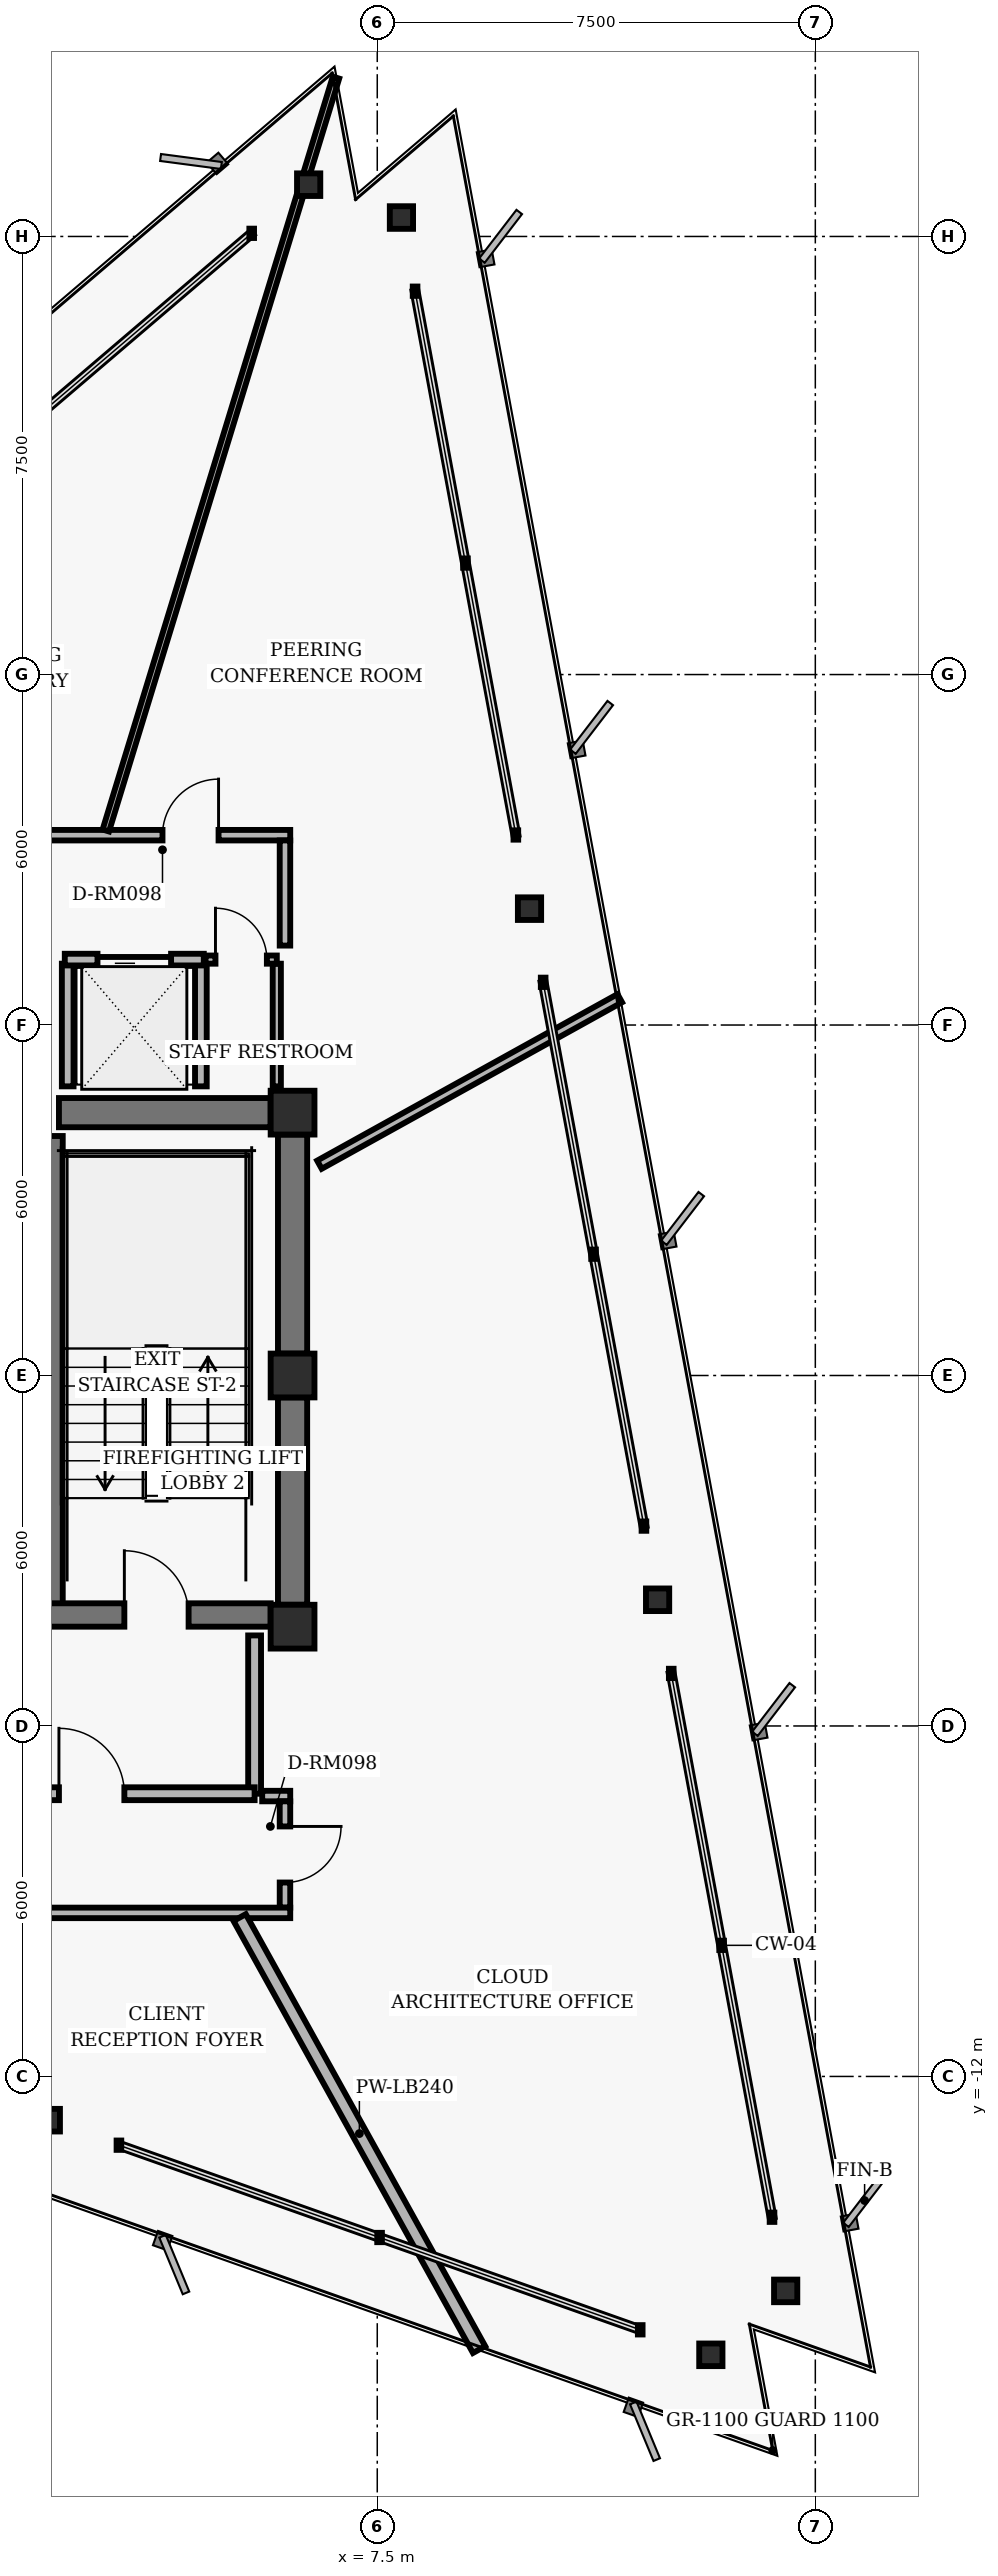
"""IFC4 building model, lengths in metres.
Left out: names, types, materials, properties, quantities, classifications, styles, units other than length and angle.
Written with IfcOpenShell. Run it as: python <this file> out.ifc"""

import sys

from ifc_helpers import new_model, si_unit, direction, frame, frame_2d, origin, origin_2d, place, context, subcontext, project, spatial, rectangle, hollow_rectangle, i_section, extrude, element, fill, save


model = new_model("IFC4")
c1 = context("Model", 3, precision=1e-05, world=origin(), true_north=direction((0.0, 1.0)))
c2 = subcontext(c1, "Body", "Model", "MODEL_VIEW")
j1 = project(units=[si_unit("LENGTHUNIT", "METRE"), si_unit("PLANEANGLEUNIT", "RADIAN")], contexts=[c1])
p1 = place(None, origin())
s1 = spatial("IfcSite", under=j1, at=p1, CompositionType="ELEMENT")
p2 = place(p1, origin())
s2 = spatial("IfcBuilding", under=s1, at=p2, CompositionType="ELEMENT")
p3 = place(p2, frame((0.0, 0.0, 175.36)))
s3 = spatial("IfcBuildingStorey", under=s2, at=p3, CompositionType="ELEMENT", Elevation=175.36)
for number, where, z_axis, x_axis in (
    (1, (6.05, 4.5, 0.0), (0.0, 0.0, 1.0), (1.0, 0.0, 0.0)),
    (2, (6.05, 0.0, 0.0), (0.0, 0.0, 1.0), (1.0, 0.0, 0.0)),
    (3, (6.05, -4.3, 0.0), (0.0, 0.0, 1.0), (1.0, 0.0, 0.0)),
):
    element("IfcColumn", number, at=place(p3, frame(where, z_axis=z_axis, x_axis=x_axis)), inside=s3, PredefinedType="COLUMN", context=c2, shape_type="SweptSolid", body=[
        extrude(hollow_rectangle(XDim=0.75, YDim=0.75, WallThickness=0.05, InnerFilletRadius=0.02, OuterFilletRadius=0.04, at=origin_2d()), origin(), (0.0, 0.0, 1.0), 3.04),
    ])
p4 = place(p3, frame((6.05, 0.375, 0.0), z_axis=(0.0, 0.0, 1.0), x_axis=(0.0, 1.0, 0.0)))
e4 = element("IfcWall", 4, at=p4, inside=s3, PredefinedType="SHEAR", context=c2, shape_type="SweptSolid", body=[
    extrude(rectangle(XDim=3.75, YDim=0.5, at=frame_2d((1.875, 0.0))), origin(), (0.0, 0.0, 1.0), 2.798),
])
p5 = place(p3, frame((6.05, -3.925, 0.0), z_axis=(0.0, 0.0, 1.0), x_axis=(0.0, 1.0, 0.0)))
e5 = element("IfcWall", 5, at=p5, inside=s3, PredefinedType="SHEAR", context=c2, shape_type="SweptSolid", body=[
    extrude(rectangle(XDim=3.55, YDim=0.5, at=frame_2d((1.775, 0.0))), origin(), (0.0, 0.0, 1.0), 2.798),
])
p6 = place(p3, frame((1.94, -4.1, 0.0), z_axis=(0.0, 0.0, 1.0), x_axis=(0.0, 1.0, 0.0)))
e6 = element("IfcWall", 6, at=p6, inside=s3, PredefinedType="SHEAR", context=c2, shape_type="SweptSolid", body=[
    extrude(rectangle(XDim=8.2, YDim=0.35, at=frame_2d((4.1, 0.0))), origin(), (0.0, 0.0, 1.0), 2.798),
])
p7 = place(p3, frame((-5.675, -4.1, 0.0), z_axis=(0.0, 0.0, 1.0), x_axis=(1.0, 0.0, 0.0)))
e7 = element("IfcWall", 7, at=p7, inside=s3, PredefinedType="SHEAR", context=c2, shape_type="SweptSolid", body=[
    extrude(rectangle(XDim=11.35, YDim=0.4, at=frame_2d((5.675, 0.0))), origin(), (0.0, 0.0, 1.0), 2.798),
])
p8 = place(p7, frame((1.405, 0.0, 0.0)))
e8 = element("IfcOpeningElement", 8, at=p8, cuts=e7, PredefinedType="OPENING", context=c2, shape_type="SweptSolid", body=[
    extrude(rectangle(XDim=1.1, YDim=2.04, at=frame_2d((0.55, 1.02))), frame((0.0, 0.21, 0.0), z_axis=(0.0, -1.0, 0.0), x_axis=(1.0, 0.0, 0.0)), (0.0, 0.0, 1.0), 0.42),
])
p9 = place(p7, frame((8.845, 0.0, 0.0)))
e9 = element("IfcOpeningElement", 9, at=p9, cuts=e7, PredefinedType="OPENING", context=c2, shape_type="SweptSolid", body=[
    extrude(rectangle(XDim=1.1, YDim=2.04, at=frame_2d((0.55, 1.02))), frame((0.0, 0.21, 0.0), z_axis=(0.0, -1.0, 0.0), x_axis=(1.0, 0.0, 0.0)), (0.0, 0.0, 1.0), 0.42),
])
p10 = place(p7, frame((4.145, 0.0, 0.0)))
e10 = element("IfcOpeningElement", 10, at=p10, cuts=e7, PredefinedType="OPENING", context=c2, shape_type="SweptSolid", body=[
    extrude(rectangle(XDim=1.06, YDim=2.04, at=frame_2d((0.53, 1.02))), frame((0.0, 0.21, 0.0), z_axis=(0.0, -1.0, 0.0), x_axis=(1.0, 0.0, 0.0)), (0.0, 0.0, 1.0), 0.42),
])
p11 = place(p7, frame((6.145, 0.0, 0.0)))
e11 = element("IfcOpeningElement", 11, at=p11, cuts=e7, PredefinedType="OPENING", context=c2, shape_type="SweptSolid", body=[
    extrude(rectangle(XDim=1.06, YDim=2.04, at=frame_2d((0.53, 1.02))), frame((0.0, 0.21, 0.0), z_axis=(0.0, -1.0, 0.0), x_axis=(1.0, 0.0, 0.0)), (0.0, 0.0, 1.0), 0.42),
])
p12 = place(p3, frame((2.05, 4.5, 0.0), z_axis=(0.0, 0.0, 1.0), x_axis=(1.0, 0.0, 0.0)))
e12 = element("IfcWall", 12, at=p12, inside=s3, PredefinedType="SHEAR", context=c2, shape_type="SweptSolid", body=[
    extrude(rectangle(XDim=3.625, YDim=0.5, at=frame_2d((1.812, 0.0))), origin(), (0.0, 0.0, 1.0), 2.798),
])
for number, where, z_axis, x_axis in (
    (13, (14.492, -15.671, 0.0), (0.0, 0.0, 1.0), (1.0, 0.0, 0.0)),
    (14, (12.3, -3.84, 0.0), (0.0, 0.0, 1.0), (1.0, 0.0, 0.0)),
    (15, (10.107, 7.992, 0.0), (0.0, 0.0, 1.0), (1.0, 0.0, 0.0)),
    (16, (7.914, 19.824, 0.0), (0.0, 0.0, 1.0), (1.0, 0.0, 0.0)),
    (17, (6.325, 20.387, 0.0), (0.0, 0.0, 1.0), (1.0, 0.0, 0.0)),
    (18, (1.868, -12.749, 0.0), (0.0, 0.0, 1.0), (1.0, 0.0, 0.0)),
    (19, (13.211, -16.766, 0.0), (0.0, 0.0, 1.0), (1.0, 0.0, 0.0)),
):
    element("IfcColumn", number, at=place(p3, frame(where, z_axis=z_axis, x_axis=x_axis)), inside=s3, PredefinedType="COLUMN", context=c2, shape_type="SweptSolid", body=[
        extrude(i_section(OverallWidth=0.398, OverallDepth=0.387, WebThickness=0.021, FlangeThickness=0.033, FilletRadius=0.018, at=origin_2d()), origin(), (0.0, 0.0, 1.0), 3.04),
    ])
p13 = place(p3, frame((5.4, -7.16, 0.0), z_axis=(0.0, 0.0, 1.0), x_axis=(0.0, 1.0, 0.0)))
e20 = element("IfcWall", 20, at=p13, inside=s3, PredefinedType="PARTITIONING", context=c2, shape_type="SweptSolid", body=[
    extrude(rectangle(XDim=2.71, YDim=0.22, at=frame_2d((1.355, 0.0))), origin(), (0.0, 0.0, 1.0), 2.773),
])
p14 = place(p3, frame((0.0, -7.16, 0.0), z_axis=(0.0, 0.0, 1.0), x_axis=(1.0, 0.0, 0.0)))
e21 = element("IfcWall", 21, at=p14, inside=s3, PredefinedType="PARTITIONING", context=c2, shape_type="SweptSolid", body=[
    extrude(rectangle(XDim=5.4, YDim=0.22, at=frame_2d((2.7, 0.0))), origin(), (0.0, 0.0, 1.0), 2.395),
])
p15 = place(p14, frame((2.05, 0.0, 0.0)))
e22 = element("IfcOpeningElement", 22, at=p15, cuts=e21, PredefinedType="OPENING", context=c2, shape_type="SweptSolid", body=[
    extrude(rectangle(XDim=1.12, YDim=2.02, at=frame_2d((0.56, 1.01))), frame((0.0, 0.12, 0.0), z_axis=(0.0, -1.0, 0.0), x_axis=(1.0, 0.0, 0.0)), (0.0, 0.0, 1.0), 0.24),
])
for number, where, z_axis, x_axis in (
    (23, (2.2, 4.95, 0.0), (0.0, 0.0, 1.0), (0.0, 1.0, 0.0)),
    (24, (4.48, 4.95, 0.0), (0.0, 0.0, 1.0), (0.0, 1.0, 0.0)),
):
    element("IfcWall", number, at=place(p3, frame(where, z_axis=z_axis, x_axis=x_axis)), inside=s3, PredefinedType="PARTITIONING", context=c2, shape_type="SweptSolid", body=[
        extrude(rectangle(XDim=2.1, YDim=0.2, at=frame_2d((1.05, 0.0))), origin(), (0.0, 0.0, 1.0), 2.773),
    ])
p16 = place(p3, frame((2.15, 7.12, 0.0), z_axis=(0.0, 0.0, 1.0), x_axis=(1.0, 0.0, 0.0)))
e25 = element("IfcWall", 25, at=p16, inside=s3, PredefinedType="PARTITIONING", context=c2, shape_type="SweptSolid", body=[
    extrude(rectangle(XDim=2.38, YDim=0.2, at=frame_2d((1.19, 0.0))), origin(), (0.0, 0.0, 1.0), 2.773),
])
p17 = place(p16, frame((0.56, 0.0, 0.0)))
e26 = element("IfcOpeningElement", 26, at=p17, cuts=e25, PredefinedType="OPENING", context=c2, shape_type="SweptSolid", body=[
    extrude(rectangle(XDim=1.26, YDim=2.06, at=frame_2d((0.63, 1.03))), frame((0.0, 0.11, 0.0), z_axis=(0.0, -1.0, 0.0), x_axis=(1.0, 0.0, 0.0)), (0.0, 0.0, 1.0), 0.22),
])
p18 = place(p3, frame((5.78, 4.95, 0.0), z_axis=(0.0, 0.0, 1.0), x_axis=(0.0, 1.0, 0.0)))
e27 = element("IfcWall", 27, at=p18, inside=s3, PredefinedType="PARTITIONING", context=c2, shape_type="SweptSolid", body=[
    extrude(rectangle(XDim=2.1, YDim=0.14, at=frame_2d((1.05, 0.0))), origin(), (0.0, 0.0, 1.0), 2.253),
])
p19 = place(p3, frame((4.56, 7.12, 0.0), z_axis=(0.0, 0.0, 1.0), x_axis=(1.0, 0.0, 0.0)))
e28 = element("IfcWall", 28, at=p19, inside=s3, PredefinedType="PARTITIONING", context=c2, shape_type="SweptSolid", body=[
    extrude(rectangle(XDim=1.22, YDim=0.14, at=frame_2d((0.61, 0.0))), origin(), (0.0, 0.0, 1.0), 2.773),
])
p20 = place(p19, frame((0.17, 0.0, 0.0)))
e29 = element("IfcOpeningElement", 29, at=p20, cuts=e28, PredefinedType="OPENING", context=c2, shape_type="SweptSolid", body=[
    extrude(rectangle(XDim=0.88, YDim=2.02, at=frame_2d((0.44, 1.01))), frame((0.0, 0.08, 0.0), z_axis=(0.0, -1.0, 0.0), x_axis=(1.0, 0.0, 0.0)), (0.0, 0.0, 1.0), 0.16),
])
p21 = place(p3, frame((-7.29, 9.25, 0.0), z_axis=(0.0, 0.0, 1.0), x_axis=(1.0, 0.0, 0.0)))
e30 = element("IfcWall", 30, at=p21, inside=s3, PredefinedType="PARTITIONING", context=c2, shape_type="SweptSolid", body=[
    extrude(rectangle(XDim=13.3, YDim=0.18, at=frame_2d((6.65, 0.0))), origin(), (0.0, 0.0, 1.0), 2.773),
])
p22 = place(p21, frame((11.113, 0.0, 0.0)))
e31 = element("IfcOpeningElement", 31, at=p22, cuts=e30, PredefinedType="OPENING", context=c2, shape_type="SweptSolid", body=[
    extrude(rectangle(XDim=0.96, YDim=2.02, at=frame_2d((0.48, 1.01))), frame((0.0, 0.1, 0.0), z_axis=(0.0, -1.0, 0.0), x_axis=(1.0, 0.0, 0.0)), (0.0, 0.0, 1.0), 0.2),
])
p23 = place(p21, frame((5.827, 0.0, 0.0)))
e32 = element("IfcOpeningElement", 32, at=p23, cuts=e30, PredefinedType="OPENING", context=c2, shape_type="SweptSolid", body=[
    extrude(rectangle(XDim=1.02, YDim=2.02, at=frame_2d((0.51, 1.01))), frame((0.0, 0.1, 0.0), z_axis=(0.0, -1.0, 0.0), x_axis=(1.0, 0.0, 0.0)), (0.0, 0.0, 1.0), 0.2),
])
p24 = place(p3, frame((5.92, 9.16, 0.0), z_axis=(0.0, 0.0, 1.0), x_axis=(0.0, -1.0, 0.0)))
e33 = element("IfcWall", 33, at=p24, inside=s3, PredefinedType="PARTITIONING", context=c2, shape_type="SweptSolid", body=[
    extrude(rectangle(XDim=1.8, YDim=0.18, at=frame_2d((0.9, 0.0))), origin(), (0.0, 0.0, 1.0), 2.253),
])
p25 = place(p3, frame((5.53, -7.2, 0.0), z_axis=(0.0, 0.0, 1.0), x_axis=(1.0, 0.0, 0.0)))
e34 = element("IfcWall", 34, at=p25, inside=s3, PredefinedType="PARTITIONING", context=c2, shape_type="SweptSolid", body=[
    extrude(rectangle(XDim=0.48, YDim=0.18, at=frame_2d((0.24, 0.0))), origin(), (0.0, 0.0, 1.0), 2.773),
])
p26 = place(p3, frame((5.92, -7.29, 0.0), z_axis=(0.0, 0.0, 1.0), x_axis=(0.0, -1.0, 0.0)))
e35 = element("IfcWall", 35, at=p26, inside=s3, PredefinedType="PARTITIONING", context=c2, shape_type="SweptSolid", body=[
    extrude(rectangle(XDim=1.82, YDim=0.18, at=frame_2d((0.91, 0.0))), origin(), (0.0, 0.0, 1.0), 2.773),
])
p27 = place(p26, frame((0.43, 0.0, 0.0)))
e36 = element("IfcOpeningElement", 36, at=p27, cuts=e35, PredefinedType="OPENING", context=c2, shape_type="SweptSolid", body=[
    extrude(rectangle(XDim=0.96, YDim=2.02, at=frame_2d((0.48, 1.01))), frame((0.0, 0.1, 0.0), z_axis=(0.0, -1.0, 0.0), x_axis=(1.0, 0.0, 0.0)), (0.0, 0.0, 1.0), 0.2),
])
p28 = place(p3, frame((6.01, -9.2, 0.0), z_axis=(0.0, 0.0, 1.0), x_axis=(-1.0, 0.0, 0.0)))
e37 = element("IfcWall", 37, at=p28, inside=s3, PredefinedType="PARTITIONING", context=c2, shape_type="SweptSolid", body=[
    extrude(rectangle(XDim=13.3, YDim=0.18, at=frame_2d((6.65, 0.0))), origin(), (0.0, 0.0, 1.0), 2.395),
])
p29 = place(p28, frame((10.465, 0.0, 0.0)))
e38 = element("IfcOpeningElement", 38, at=p29, cuts=e37, PredefinedType="OPENING", context=c2, shape_type="SweptSolid", body=[
    extrude(rectangle(XDim=0.96, YDim=2.02, at=frame_2d((0.48, 1.01))), frame((0.0, 0.1, 0.0), z_axis=(0.0, -1.0, 0.0), x_axis=(1.0, 0.0, 0.0)), (0.0, 0.0, 1.0), 0.2),
])
p30 = place(p28, frame((4.373, 0.0, 0.0)))
e39 = element("IfcOpeningElement", 39, at=p30, cuts=e37, PredefinedType="OPENING", context=c2, shape_type="SweptSolid", body=[
    extrude(rectangle(XDim=0.96, YDim=2.02, at=frame_2d((0.48, 1.01))), frame((0.0, 0.1, 0.0), z_axis=(0.0, -1.0, 0.0), x_axis=(1.0, 0.0, 0.0)), (0.0, 0.0, 1.0), 0.2),
])
p31 = place(p3, frame((5.144, -9.28, 0.0), z_axis=(0.0, 0.0, 1.0), x_axis=(0.484804355006, -0.874622625689, 0.0)))
e40 = element("IfcWall", 40, at=p31, inside=s3, PredefinedType="PARTITIONING", context=c2, shape_type="SweptSolid", body=[
    extrude(rectangle(XDim=8.456, YDim=0.24, at=frame_2d((4.228, 0.0))), origin(), (0.0, 0.0, 1.0), 2.773),
])
p32 = place(p3, frame((6.51, 3.609, 0.0), z_axis=(0.0, 0.0, 1.0), x_axis=(0.874634801292, 0.484782388675, 0.0)))
e41 = element("IfcWall", 41, at=p32, inside=s3, PredefinedType="PARTITIONING", context=c2, shape_type="SweptSolid", body=[
    extrude(rectangle(XDim=5.879, YDim=0.16, at=frame_2d((2.939, 0.0))), origin(), (0.0, 0.0, 1.0), 2.773),
])
p33 = place(p3, frame((2.853, 9.33, 0.0), z_axis=(0.0, 0.0, 1.0), x_axis=(0.292365790083, 0.95630656423, 0.0)))
e42 = element("IfcWall", 42, at=p33, inside=s3, PredefinedType="MOVABLE", context=c2, shape_type="SweptSolid", body=[
    extrude(rectangle(XDim=13.479, YDim=0.115, at=frame_2d((6.739, 0.0))), origin(), (0.0, 0.0, 1.0), 2.253),
])
p34 = place(p9, origin())
e43 = element("IfcDoor", 43, at=p34, inside=s3, OperationType="SINGLE_SWING_LEFT", PredefinedType="DOOR", context=c2, shape_type="SweptSolid", body=[
    extrude(rectangle(XDim=1.1, YDim=2.04, at=frame_2d((0.55, 1.02))), frame((0.0, 0.025, 0.0), z_axis=(0.0, -1.0, 0.0), x_axis=(1.0, 0.0, 0.0)), (0.0, 0.0, 1.0), 0.05),
])
fill(e9, e43)
p35 = place(p15, origin())
e44 = element("IfcDoor", 44, at=p35, inside=s3, OperationType="SINGLE_SWING_LEFT", PredefinedType="DOOR", context=c2, shape_type="SweptSolid", body=[
    extrude(rectangle(XDim=1.12, YDim=2.02, at=frame_2d((0.56, 1.01))), frame((0.0, 0.025, 0.0), z_axis=(0.0, -1.0, 0.0), x_axis=(1.0, 0.0, 0.0)), (0.0, 0.0, 1.0), 0.05),
])
fill(e22, e44)
p36 = place(p17, origin())
e45 = element("IfcDoor", 45, at=p36, inside=s3, OperationType="SLIDING_TO_LEFT", PredefinedType="DOOR", context=c2, shape_type="SweptSolid", body=[
    extrude(rectangle(XDim=1.26, YDim=2.06, at=frame_2d((0.63, 1.03))), frame((0.0, 0.025, 0.0), z_axis=(0.0, -1.0, 0.0), x_axis=(1.0, 0.0, 0.0)), (0.0, 0.0, 1.0), 0.05),
])
fill(e26, e45)
p37 = place(p20, origin())
e46 = element("IfcDoor", 46, at=p37, inside=s3, OperationType="SINGLE_SWING_LEFT", PredefinedType="DOOR", context=c2, shape_type="SweptSolid", body=[
    extrude(rectangle(XDim=0.88, YDim=2.02, at=frame_2d((0.44, 1.01))), frame((0.0, 0.025, 0.0), z_axis=(0.0, -1.0, 0.0), x_axis=(1.0, 0.0, 0.0)), (0.0, 0.0, 1.0), 0.05),
])
fill(e29, e46)
p38 = place(p27, origin())
e47 = element("IfcDoor", 47, at=p38, inside=s3, OperationType="SINGLE_SWING_LEFT", PredefinedType="DOOR", context=c2, shape_type="SweptSolid", body=[
    extrude(rectangle(XDim=0.96, YDim=2.02, at=frame_2d((0.48, 1.01))), frame((0.0, 0.025, 0.0), z_axis=(0.0, -1.0, 0.0), x_axis=(1.0, 0.0, 0.0)), (0.0, 0.0, 1.0), 0.05),
])
fill(e36, e47)
p39 = place(p22, origin())
e48 = element("IfcDoor", 48, at=p39, inside=s3, OperationType="SINGLE_SWING_RIGHT", PredefinedType="DOOR", context=c2, shape_type="SweptSolid", body=[
    extrude(rectangle(XDim=0.96, YDim=2.02, at=frame_2d((0.48, 1.01))), frame((0.0, 0.025, 0.0), z_axis=(0.0, -1.0, 0.0), x_axis=(1.0, 0.0, 0.0)), (0.0, 0.0, 1.0), 0.05),
])
fill(e31, e48)
save(model, sys.argv[1])
